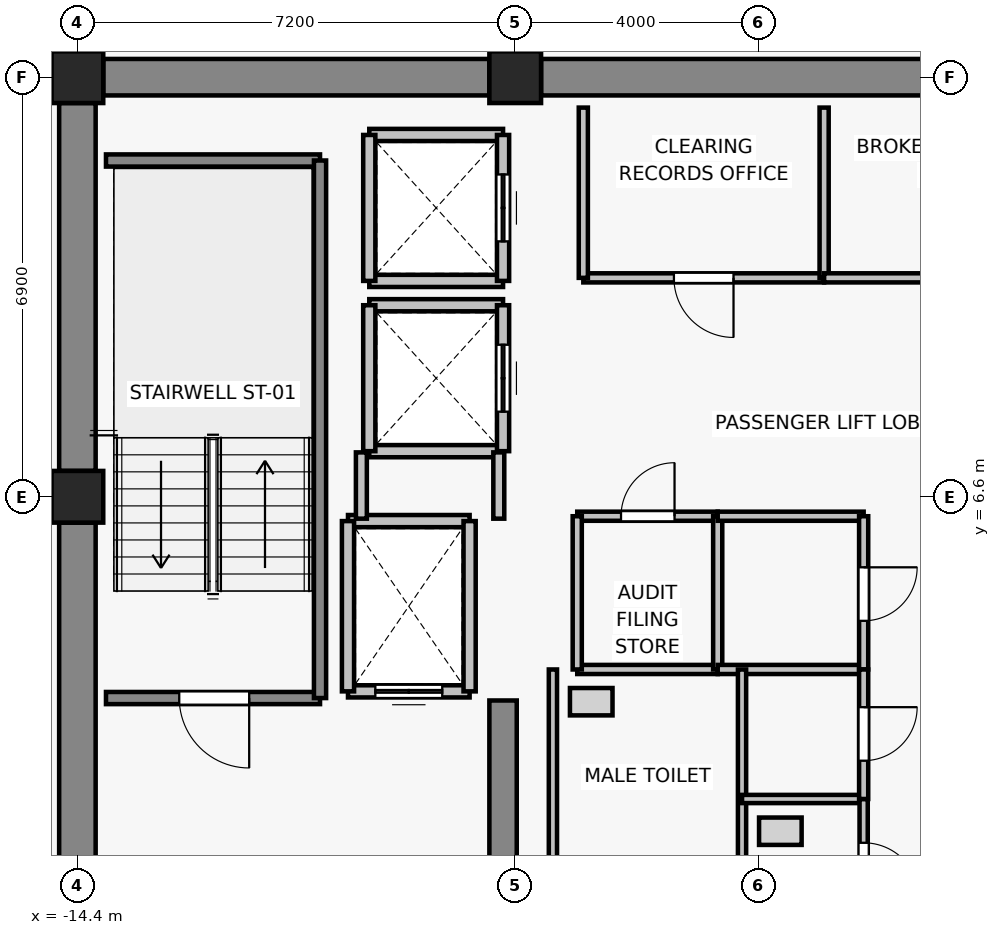
"""IFC4 building model, lengths in metres.
Left out: names, types, materials, properties, quantities, classifications, styles, units other than length and angle.
Written with IfcOpenShell. Run it as: python <this file> out.ifc"""

import sys

from ifc_helpers import new_model, si_unit, direction, frame, frame_2d, origin, origin_2d, place, context, subcontext, project, spatial, rectangle, extrude, source, transform, mapped, element, fill, save


model = new_model("IFC4")
c1 = context("Model", 3, precision=1e-05, world=origin(), true_north=direction((0.0, 1.0)))
c2 = subcontext(c1, "Body", "Model", "MODEL_VIEW")
j1 = project(units=[si_unit("LENGTHUNIT", "METRE"), si_unit("PLANEANGLEUNIT", "RADIAN")], contexts=[c1])
p1 = place(None, origin())
s1 = spatial("IfcSite", under=j1, at=p1, CompositionType="ELEMENT")
p2 = place(p1, origin())
s2 = spatial("IfcBuilding", under=s1, at=p2, CompositionType="ELEMENT")
p3 = place(p2, frame((0.0, 0.0, 248.5)))
s3 = spatial("IfcBuildingStorey", under=s2, at=p3, CompositionType="ELEMENT", Elevation=248.5)
for number, where, z_axis, x_axis in (
    (1, (-14.4, 6.6, 0.0), (0.0, 0.0, 1.0), (1.0, 0.0, 0.0)),
    (2, (-14.4, 13.5, 0.0), (0.0, 0.0, 1.0), (1.0, 0.0, 0.0)),
    (3, (-7.2, 13.5, 0.0), (0.0, 0.0, 1.0), (1.0, 0.0, 0.0)),
):
    element("IfcColumn", number, at=place(p3, frame(where, z_axis=z_axis, x_axis=x_axis)), inside=s3, PredefinedType="COLUMN", context=c2, shape_type="SweptSolid", body=[
        extrude(rectangle(XDim=0.85, YDim=0.85, at=origin_2d()), origin(), (0.0, 0.0, 1.0), 3.3),
    ])
p4 = place(p3, frame((-13.975, 13.5, 0.0), z_axis=(0.0, 0.0, 1.0), x_axis=(1.0, 0.0, 0.0)))
e4 = element("IfcWall", 4, at=p4, inside=s3, PredefinedType="SHEAR", context=c2, shape_type="SweptSolid", body=[
    extrude(rectangle(XDim=6.35, YDim=0.6, at=frame_2d((3.175, 0.0))), origin(), (0.0, 0.0, 1.0), 3.075),
])
p5 = place(p3, frame((-6.775, 13.5, 0.0), z_axis=(0.0, 0.0, 1.0), x_axis=(1.0, 0.0, 0.0)))
e5 = element("IfcWall", 5, at=p5, inside=s3, PredefinedType="SHEAR", context=c2, shape_type="SweptSolid", body=[
    extrude(rectangle(XDim=13.55, YDim=0.6, at=frame_2d((6.775, 0.0))), origin(), (0.0, 0.0, 1.0), 3.075),
])
p6 = place(p3, frame((-14.4, -0.775, 0.0), z_axis=(0.0, 0.0, 1.0), x_axis=(0.0, 1.0, 0.0)))
e6 = element("IfcWall", 6, at=p6, inside=s3, PredefinedType="SHEAR", context=c2, shape_type="SweptSolid", body=[
    extrude(rectangle(XDim=6.95, YDim=0.6, at=frame_2d((3.475, 0.0))), origin(), (0.0, 0.0, 1.0), 3.075),
])
p7 = place(p3, frame((-14.4, 7.025, 0.0), z_axis=(0.0, 0.0, 1.0), x_axis=(0.0, 1.0, 0.0)))
e7 = element("IfcWall", 7, at=p7, inside=s3, PredefinedType="SHEAR", context=c2, shape_type="SweptSolid", body=[
    extrude(rectangle(XDim=6.05, YDim=0.6, at=frame_2d((3.025, 0.0))), origin(), (0.0, 0.0, 1.0), 3.075),
])
p8 = place(p3, frame((-7.4, -0.9, 0.0), z_axis=(0.0, 0.0, 1.0), x_axis=(0.0, 1.0, 0.0)))
e8 = element("IfcWall", 8, at=p8, inside=s3, PredefinedType="SHEAR", context=c2, shape_type="SweptSolid", body=[
    extrude(rectangle(XDim=4.15, YDim=0.45, at=frame_2d((2.075, 0.0))), origin(), (0.0, 0.0, 1.0), 3.075),
])
p9 = place(p3, frame((-7.95, 3.4, 0.0), z_axis=(0.0, 0.0, 1.0), x_axis=(-1.0, 0.0, 0.0)))
e9 = element("IfcWall", 9, at=p9, inside=s3, PredefinedType="SOLIDWALL", context=c2, shape_type="SweptSolid", body=[
    extrude(rectangle(XDim=2.0, YDim=0.2, at=frame_2d((1.0, 0.0))), origin(), (0.0, 0.0, 1.0), 3.075),
])
p10 = place(p9, frame((0.45, 0.0, 0.0)))
e10 = element("IfcOpeningElement", 10, at=p10, cuts=e9, PredefinedType="OPENING", context=c2, shape_type="SweptSolid", body=[
    extrude(rectangle(XDim=1.1, YDim=2.2, at=frame_2d((0.55, 1.1))), frame((0.0, 0.11, 0.0), z_axis=(0.0, -1.0, 0.0), x_axis=(1.0, 0.0, 0.0)), (0.0, 0.0, 1.0), 0.22),
])
p11 = place(p3, frame((-9.95, 6.2, 0.0), z_axis=(0.0, 0.0, 1.0), x_axis=(1.0, 0.0, 0.0)))
e11 = element("IfcWall", 11, at=p11, inside=s3, PredefinedType="SOLIDWALL", context=c2, shape_type="SweptSolid", body=[
    extrude(rectangle(XDim=2.0, YDim=0.2, at=frame_2d((1.0, 0.0))), origin(), (0.0, 0.0, 1.0), 3.075),
])
for number, where, z_axis, x_axis in (
    (12, (-9.95, 3.4, 0.0), (0.0, 0.0, 1.0), (0.0, 1.0, 0.0)),
    (13, (-7.95, 6.2, 0.0), (0.0, 0.0, 1.0), (0.0, -1.0, 0.0)),
):
    element("IfcWall", number, at=place(p3, frame(where, z_axis=z_axis, x_axis=x_axis)), inside=s3, PredefinedType="SOLIDWALL", context=c2, shape_type="SweptSolid", body=[
        extrude(rectangle(XDim=2.8, YDim=0.2, at=frame_2d((1.4, 0.0))), origin(), (0.0, 0.0, 1.0), 3.075),
    ])
for number, where, z_axis, x_axis in (
    (14, (-7.4, 7.35, 0.0), (0.0, 0.0, 1.0), (-1.0, 0.0, 0.0)),
    (15, (-9.6, 9.75, 0.0), (0.0, 0.0, 1.0), (1.0, 0.0, 0.0)),
):
    element("IfcWall", number, at=place(p3, frame(where, z_axis=z_axis, x_axis=x_axis)), inside=s3, PredefinedType="SOLIDWALL", context=c2, shape_type="SweptSolid", body=[
        extrude(rectangle(XDim=2.2, YDim=0.2, at=frame_2d((1.1, 0.0))), origin(), (0.0, 0.0, 1.0), 2.615),
    ])
p12 = place(p3, frame((-9.6, 7.35, 0.0), z_axis=(0.0, 0.0, 1.0), x_axis=(0.0, 1.0, 0.0)))
e16 = element("IfcWall", 16, at=p12, inside=s3, PredefinedType="SOLIDWALL", context=c2, shape_type="SweptSolid", body=[
    extrude(rectangle(XDim=2.4, YDim=0.2, at=frame_2d((1.2, 0.0))), origin(), (0.0, 0.0, 1.0), 3.075),
])
p13 = place(p3, frame((-7.4, 9.75, 0.0), z_axis=(0.0, 0.0, 1.0), x_axis=(0.0, -1.0, 0.0)))
e17 = element("IfcWall", 17, at=p13, inside=s3, PredefinedType="SOLIDWALL", context=c2, shape_type="SweptSolid", body=[
    extrude(rectangle(XDim=2.4, YDim=0.2, at=frame_2d((1.2, 0.0))), origin(), (0.0, 0.0, 1.0), 2.615),
])
p14 = place(p13, frame((0.65, 0.0, 0.0)))
e18 = element("IfcOpeningElement", 18, at=p14, cuts=e17, PredefinedType="OPENING", context=c2, shape_type="SweptSolid", body=[
    extrude(rectangle(XDim=1.1, YDim=2.2, at=frame_2d((0.55, 1.1))), frame((0.0, 0.11, 0.0), z_axis=(0.0, -1.0, 0.0), x_axis=(1.0, 0.0, 0.0)), (0.0, 0.0, 1.0), 0.22),
])
for number, where, z_axis, x_axis in (
    (19, (-7.4, 10.15, 0.0), (0.0, 0.0, 1.0), (-1.0, 0.0, 0.0)),
    (20, (-9.6, 12.55, 0.0), (0.0, 0.0, 1.0), (1.0, 0.0, 0.0)),
):
    element("IfcWall", number, at=place(p3, frame(where, z_axis=z_axis, x_axis=x_axis)), inside=s3, PredefinedType="SOLIDWALL", context=c2, shape_type="SweptSolid", body=[
        extrude(rectangle(XDim=2.2, YDim=0.2, at=frame_2d((1.1, 0.0))), origin(), (0.0, 0.0, 1.0), 2.615),
    ])
p15 = place(p3, frame((-9.6, 10.15, 0.0), z_axis=(0.0, 0.0, 1.0), x_axis=(0.0, 1.0, 0.0)))
e21 = element("IfcWall", 21, at=p15, inside=s3, PredefinedType="SOLIDWALL", context=c2, shape_type="SweptSolid", body=[
    extrude(rectangle(XDim=2.4, YDim=0.2, at=frame_2d((1.2, 0.0))), origin(), (0.0, 0.0, 1.0), 3.075),
])
p16 = place(p3, frame((-7.4, 12.55, 0.0), z_axis=(0.0, 0.0, 1.0), x_axis=(0.0, -1.0, 0.0)))
e22 = element("IfcWall", 22, at=p16, inside=s3, PredefinedType="SOLIDWALL", context=c2, shape_type="SweptSolid", body=[
    extrude(rectangle(XDim=2.4, YDim=0.2, at=frame_2d((1.2, 0.0))), origin(), (0.0, 0.0, 1.0), 2.615),
])
p17 = place(p16, frame((0.65, 0.0, 0.0)))
e23 = element("IfcOpeningElement", 23, at=p17, cuts=e22, PredefinedType="OPENING", context=c2, shape_type="SweptSolid", body=[
    extrude(rectangle(XDim=1.1, YDim=2.2, at=frame_2d((0.55, 1.1))), frame((0.0, 0.11, 0.0), z_axis=(0.0, -1.0, 0.0), x_axis=(1.0, 0.0, 0.0)), (0.0, 0.0, 1.0), 0.22),
])
p18 = place(p3, frame((-10.41, 3.29, 0.0), z_axis=(0.0, 0.0, 1.0), x_axis=(-1.0, 0.0, 0.0)))
e24 = element("IfcWall", 24, at=p18, inside=s3, PredefinedType="SOLIDWALL", context=c2, shape_type="SweptSolid", body=[
    extrude(rectangle(XDim=3.52, YDim=0.2, at=frame_2d((1.76, 0.0))), origin(), (0.0, 0.0, 1.0), 3.075),
])
p19 = place(p18, frame((1.165, 0.0, 0.0)))
e25 = element("IfcOpeningElement", 25, at=p19, cuts=e24, PredefinedType="OPENING", context=c2, shape_type="SweptSolid", body=[
    extrude(rectangle(XDim=1.15, YDim=2.15, at=frame_2d((0.575, 1.075))), frame((0.0, 0.11, 0.0), z_axis=(0.0, -1.0, 0.0), x_axis=(1.0, 0.0, 0.0)), (0.0, 0.0, 1.0), 0.22),
])
p20 = place(p3, frame((-13.93, 12.13, 0.0), z_axis=(0.0, 0.0, 1.0), x_axis=(1.0, 0.0, 0.0)))
e26 = element("IfcWall", 26, at=p20, inside=s3, PredefinedType="SOLIDWALL", context=c2, shape_type="SweptSolid", body=[
    extrude(rectangle(XDim=3.52, YDim=0.2, at=frame_2d((1.76, 0.0))), origin(), (0.0, 0.0, 1.0), 3.075),
])
p21 = place(p3, frame((-10.41, 12.13, 0.0), z_axis=(0.0, 0.0, 1.0), x_axis=(0.0, -1.0, 0.0)))
e27 = element("IfcWall", 27, at=p21, inside=s3, PredefinedType="SOLIDWALL", context=c2, shape_type="SweptSolid", body=[
    extrude(rectangle(XDim=8.84, YDim=0.2, at=frame_2d((4.42, 0.0))), origin(), (0.0, 0.0, 1.0), 3.075),
])
p22 = place(p3, frame((-9.73, 6.24, 0.0), z_axis=(0.0, 0.0, 1.0), x_axis=(0.0, 1.0, 0.0)))
e28 = element("IfcWall", 28, at=p22, inside=s3, PredefinedType="PARTITIONING", context=c2, shape_type="SweptSolid", body=[
    extrude(rectangle(XDim=1.09, YDim=0.18, at=frame_2d((0.545, 0.0))), origin(), (0.0, 0.0, 1.0), 3.075),
])
p23 = place(p3, frame((-7.47, 7.33, 0.0), z_axis=(0.0, 0.0, 1.0), x_axis=(0.0, -1.0, 0.0)))
e29 = element("IfcWall", 29, at=p23, inside=s3, PredefinedType="PARTITIONING", context=c2, shape_type="SweptSolid", body=[
    extrude(rectangle(XDim=1.09, YDim=0.18, at=frame_2d((0.545, 0.0))), origin(), (0.0, 0.0, 1.0), 2.615),
])
p24 = place(p3, frame((-2.12, 10.2, 0.0), z_axis=(0.0, 0.0, 1.0), x_axis=(-1.0, 0.0, 0.0)))
e30 = element("IfcWall", 30, at=p24, inside=s3, PredefinedType="PARTITIONING", context=c2, shape_type="SweptSolid", body=[
    extrude(rectangle(XDim=3.96, YDim=0.15, at=frame_2d((1.98, 0.0))), origin(), (0.0, 0.0, 1.0), 3.075),
])
p25 = place(p24, frame((1.49, 0.0, 0.0)))
e31 = element("IfcOpeningElement", 31, at=p25, cuts=e30, PredefinedType="OPENING", context=c2, shape_type="SweptSolid", body=[
    extrude(rectangle(XDim=0.98, YDim=2.15, at=frame_2d((0.49, 1.075))), frame((0.0, 0.085, 0.0), z_axis=(0.0, -1.0, 0.0), x_axis=(1.0, 0.0, 0.0)), (0.0, 0.0, 1.0), 0.17),
])
for number, where, z_axis, x_axis in (
    (32, (-6.08, 10.2, 0.0), (0.0, 0.0, 1.0), (0.0, 1.0, 0.0)),
    (33, (-2.12, 13.0, 0.0), (0.0, 0.0, 1.0), (0.0, -1.0, 0.0)),
):
    element("IfcWall", number, at=place(p3, frame(where, z_axis=z_axis, x_axis=x_axis)), inside=s3, PredefinedType="PARTITIONING", context=c2, shape_type="SweptSolid", body=[
        extrude(rectangle(XDim=2.8, YDim=0.15, at=frame_2d((1.4, 0.0))), origin(), (0.0, 0.0, 1.0), 3.075),
    ])
p26 = place(p3, frame((2.04, 10.2, 0.0), z_axis=(0.0, 0.0, 1.0), x_axis=(-1.0, 0.0, 0.0)))
e34 = element("IfcWall", 34, at=p26, inside=s3, PredefinedType="PARTITIONING", context=c2, shape_type="SweptSolid", body=[
    extrude(rectangle(XDim=4.16, YDim=0.15, at=frame_2d((2.08, 0.0))), origin(), (0.0, 0.0, 1.0), 3.075),
])
p27 = place(p26, frame((1.55, 0.0, 0.0)))
e35 = element("IfcOpeningElement", 35, at=p27, cuts=e34, PredefinedType="OPENING", context=c2, shape_type="SweptSolid", body=[
    extrude(rectangle(XDim=0.98, YDim=2.15, at=frame_2d((0.49, 1.075))), frame((0.0, 0.085, 0.0), z_axis=(0.0, -1.0, 0.0), x_axis=(1.0, 0.0, 0.0)), (0.0, 0.0, 1.0), 0.17),
])
p28 = place(p3, frame((-3.87, 3.76, 0.0), z_axis=(0.0, 0.0, 1.0), x_axis=(-1.0, 0.0, 0.0)))
e36 = element("IfcWall", 36, at=p28, inside=s3, PredefinedType="PARTITIONING", context=c2, shape_type="SweptSolid", body=[
    extrude(rectangle(XDim=2.31, YDim=0.15, at=frame_2d((1.155, 0.0))), origin(), (0.0, 0.0, 1.0), 3.075),
])
p29 = place(p3, frame((-6.18, 6.28, 0.0), z_axis=(0.0, 0.0, 1.0), x_axis=(1.0, 0.0, 0.0)))
e37 = element("IfcWall", 37, at=p29, inside=s3, PredefinedType="PARTITIONING", context=c2, shape_type="SweptSolid", body=[
    extrude(rectangle(XDim=2.31, YDim=0.15, at=frame_2d((1.155, 0.0))), origin(), (0.0, 0.0, 1.0), 3.075),
])
p30 = place(p29, frame((0.72, 0.0, 0.0)))
e38 = element("IfcOpeningElement", 38, at=p30, cuts=e37, PredefinedType="OPENING", context=c2, shape_type="SweptSolid", body=[
    extrude(rectangle(XDim=0.88, YDim=2.1, at=frame_2d((0.44, 1.05))), frame((0.0, 0.085, 0.0), z_axis=(0.0, -1.0, 0.0), x_axis=(1.0, 0.0, 0.0)), (0.0, 0.0, 1.0), 0.17),
])
for number, where, z_axis, x_axis in (
    (39, (-6.18, 3.76, 0.0), (0.0, 0.0, 1.0), (0.0, 1.0, 0.0)),
    (40, (-3.87, 6.28, 0.0), (0.0, 0.0, 1.0), (0.0, -1.0, 0.0)),
):
    element("IfcWall", number, at=place(p3, frame(where, z_axis=z_axis, x_axis=x_axis)), inside=s3, PredefinedType="PARTITIONING", context=c2, shape_type="SweptSolid", body=[
        extrude(rectangle(XDim=2.52, YDim=0.15, at=frame_2d((1.26, 0.0))), origin(), (0.0, 0.0, 1.0), 3.075),
    ])
for number, where, z_axis, x_axis in (
    (41, (-1.47, 3.76, 0.0), (0.0, 0.0, 1.0), (-1.0, 0.0, 0.0)),
    (42, (-3.87, 6.28, 0.0), (0.0, 0.0, 1.0), (1.0, 0.0, 0.0)),
):
    element("IfcWall", number, at=place(p3, frame(where, z_axis=z_axis, x_axis=x_axis)), inside=s3, PredefinedType="PARTITIONING", context=c2, shape_type="SweptSolid", body=[
        extrude(rectangle(XDim=2.4, YDim=0.15, at=frame_2d((1.2, 0.0))), origin(), (0.0, 0.0, 1.0), 3.075),
    ])
p31 = place(p3, frame((-1.47, 6.28, 0.0), z_axis=(0.0, 0.0, 1.0), x_axis=(0.0, -1.0, 0.0)))
e43 = element("IfcWall", 43, at=p31, inside=s3, PredefinedType="PARTITIONING", context=c2, shape_type="SweptSolid", body=[
    extrude(rectangle(XDim=2.52, YDim=0.15, at=frame_2d((1.26, 0.0))), origin(), (0.0, 0.0, 1.0), 3.075),
])
p32 = place(p31, frame((0.84, 0.0, 0.0)))
e44 = element("IfcOpeningElement", 44, at=p32, cuts=e43, PredefinedType="OPENING", context=c2, shape_type="SweptSolid", body=[
    extrude(rectangle(XDim=0.88, YDim=2.1, at=frame_2d((0.44, 1.05))), frame((0.0, 0.085, 0.0), z_axis=(0.0, -1.0, 0.0), x_axis=(1.0, 0.0, 0.0)), (0.0, 0.0, 1.0), 0.17),
])
for number, where, z_axis, x_axis in (
    (45, (-6.58, -0.73, 0.0), (0.0, 0.0, 1.0), (0.0, 1.0, 0.0)),
    (46, (-3.47, 3.76, 0.0), (0.0, 0.0, 1.0), (0.0, -1.0, 0.0)),
):
    element("IfcWall", number, at=place(p3, frame(where, z_axis=z_axis, x_axis=x_axis)), inside=s3, PredefinedType="PARTITIONING", context=c2, shape_type="SweptSolid", body=[
        extrude(rectangle(XDim=4.49, YDim=0.135, at=frame_2d((2.245, 0.0))), origin(), (0.0, 0.0, 1.0), 3.075),
    ])
p33 = place(p3, frame((-3.47, 1.63, 0.0), z_axis=(0.0, 0.0, 1.0), x_axis=(1.0, 0.0, 0.0)))
e47 = element("IfcWall", 47, at=p33, inside=s3, PredefinedType="PARTITIONING", context=c2, shape_type="SweptSolid", body=[
    extrude(rectangle(XDim=2.0, YDim=0.135, at=frame_2d((1.0, 0.0))), origin(), (0.0, 0.0, 1.0), 3.075),
])
p34 = place(p3, frame((-1.47, 1.63, 0.0), z_axis=(0.0, 0.0, 1.0), x_axis=(0.0, -1.0, 0.0)))
e48 = element("IfcWall", 48, at=p34, inside=s3, PredefinedType="PARTITIONING", context=c2, shape_type="SweptSolid", body=[
    extrude(rectangle(XDim=2.36, YDim=0.135, at=frame_2d((1.18, 0.0))), origin(), (0.0, 0.0, 1.0), 3.075),
])
p35 = place(p34, frame((0.72, 0.0, 0.0)))
e49 = element("IfcOpeningElement", 49, at=p35, cuts=e48, PredefinedType="OPENING", context=c2, shape_type="SweptSolid", body=[
    extrude(rectangle(XDim=0.92, YDim=2.1, at=frame_2d((0.46, 1.05))), frame((0.0, 0.077, 0.0), z_axis=(0.0, -1.0, 0.0), x_axis=(1.0, 0.0, 0.0)), (0.0, 0.0, 1.0), 0.155),
])
p36 = place(p3, frame((-1.47, 3.76, 0.0), z_axis=(0.0, 0.0, 1.0), x_axis=(0.0, -1.0, 0.0)))
e50 = element("IfcWall", 50, at=p36, inside=s3, PredefinedType="PARTITIONING", context=c2, shape_type="SweptSolid", body=[
    extrude(rectangle(XDim=2.13, YDim=0.15, at=frame_2d((1.065, 0.0))), origin(), (0.0, 0.0, 1.0), 3.075),
])
p37 = place(p36, frame((0.62, 0.0, 0.0)))
e51 = element("IfcOpeningElement", 51, at=p37, cuts=e50, PredefinedType="OPENING", context=c2, shape_type="SweptSolid", body=[
    extrude(rectangle(XDim=0.88, YDim=2.1, at=frame_2d((0.44, 1.05))), frame((0.0, 0.085, 0.0), z_axis=(0.0, -1.0, 0.0), x_axis=(1.0, 0.0, 0.0)), (0.0, 0.0, 1.0), 0.17),
])
m1 = source(origin(), c2, "Body", "SweptSolid", [
    extrude(rectangle(XDim=1.1, YDim=2.2, at=frame_2d((0.55, 1.1))), frame((0.0, 0.025, 0.0), z_axis=(0.0, -1.0, 0.0), x_axis=(1.0, 0.0, 0.0)), (0.0, 0.0, 1.0), 0.05),
])
p38 = place(p10, origin())
e52 = element("IfcDoor", 52, at=p38, inside=s3, OperationType="DOUBLE_DOOR_SLIDING", PredefinedType="DOOR", context=c2, shape_type="MappedRepresentation", body=[
    mapped(m1, transform((0.0, 0.0, 0.0), x_axis=(1.0, 0.0, 0.0), y_axis=(0.0, 1.0, 0.0), z_axis=(0.0, 0.0, 1.0), scale=1.0)),
])
fill(e10, e52)
p39 = place(p14, origin())
e53 = element("IfcDoor", 53, at=p39, inside=s3, OperationType="DOUBLE_DOOR_SLIDING", PredefinedType="DOOR", context=c2, shape_type="MappedRepresentation", body=[
    mapped(m1, transform((0.0, 0.0, 0.0), x_axis=(1.0, 0.0, 0.0), y_axis=(0.0, 1.0, 0.0), z_axis=(0.0, 0.0, 1.0), scale=1.0)),
])
fill(e18, e53)
p40 = place(p17, origin())
e54 = element("IfcDoor", 54, at=p40, inside=s3, OperationType="DOUBLE_DOOR_SLIDING", PredefinedType="DOOR", context=c2, shape_type="MappedRepresentation", body=[
    mapped(m1, transform((0.0, 0.0, 0.0), x_axis=(1.0, 0.0, 0.0), y_axis=(0.0, 1.0, 0.0), z_axis=(0.0, 0.0, 1.0), scale=1.0)),
])
fill(e23, e54)
m2 = source(origin(), c2, "Body", "SweptSolid", [
    extrude(rectangle(XDim=1.15, YDim=2.15, at=frame_2d((0.575, 1.075))), frame((0.0, 0.025, 0.0), z_axis=(0.0, -1.0, 0.0), x_axis=(1.0, 0.0, 0.0)), (0.0, 0.0, 1.0), 0.05),
])
p41 = place(p19, origin())
e55 = element("IfcDoor", 55, at=p41, inside=s3, OperationType="SINGLE_SWING_LEFT", PredefinedType="DOOR", context=c2, shape_type="MappedRepresentation", body=[
    mapped(m2, transform((0.0, 0.0, 0.0), x_axis=(1.0, 0.0, 0.0), y_axis=(0.0, 1.0, 0.0), z_axis=(0.0, 0.0, 1.0), scale=1.0)),
])
fill(e25, e55)
m3 = source(origin(), c2, "Body", "SweptSolid", [
    extrude(rectangle(XDim=0.98, YDim=2.15, at=frame_2d((0.49, 1.075))), frame((0.0, 0.025, 0.0), z_axis=(0.0, -1.0, 0.0), x_axis=(1.0, 0.0, 0.0)), (0.0, 0.0, 1.0), 0.05),
])
p42 = place(p25, origin())
e56 = element("IfcDoor", 56, at=p42, inside=s3, OperationType="SINGLE_SWING_LEFT", PredefinedType="DOOR", context=c2, shape_type="MappedRepresentation", body=[
    mapped(m3, transform((0.0, 0.0, 0.0), x_axis=(1.0, 0.0, 0.0), y_axis=(0.0, 1.0, 0.0), z_axis=(0.0, 0.0, 1.0), scale=1.0)),
])
fill(e31, e56)
m4 = source(origin(), c2, "Body", "SweptSolid", [
    extrude(rectangle(XDim=0.88, YDim=2.1, at=frame_2d((0.44, 1.05))), frame((0.0, 0.025, 0.0), z_axis=(0.0, -1.0, 0.0), x_axis=(1.0, 0.0, 0.0)), (0.0, 0.0, 1.0), 0.05),
])
p43 = place(p30, origin())
e57 = element("IfcDoor", 57, at=p43, inside=s3, OperationType="SINGLE_SWING_RIGHT", PredefinedType="DOOR", context=c2, shape_type="MappedRepresentation", body=[
    mapped(m4, transform((0.0, 0.0, 0.0), x_axis=(1.0, 0.0, 0.0), y_axis=(0.0, 1.0, 0.0), z_axis=(0.0, 0.0, 1.0), scale=1.0)),
])
fill(e38, e57)
p44 = place(p32, origin())
e58 = element("IfcDoor", 58, at=p44, inside=s3, OperationType="SINGLE_SWING_LEFT", PredefinedType="DOOR", context=c2, shape_type="MappedRepresentation", body=[
    mapped(m4, transform((0.0, 0.0, 0.0), x_axis=(1.0, 0.0, 0.0), y_axis=(0.0, 1.0, 0.0), z_axis=(0.0, 0.0, 1.0), scale=1.0)),
])
fill(e44, e58)
m5 = source(origin(), c2, "Body", "SweptSolid", [
    extrude(rectangle(XDim=0.92, YDim=2.1, at=frame_2d((0.46, 1.05))), frame((0.0, 0.025, 0.0), z_axis=(0.0, -1.0, 0.0), x_axis=(1.0, 0.0, 0.0)), (0.0, 0.0, 1.0), 0.05),
])
p45 = place(p35, origin())
e59 = element("IfcDoor", 59, at=p45, inside=s3, OperationType="SINGLE_SWING_RIGHT", PredefinedType="DOOR", context=c2, shape_type="MappedRepresentation", body=[
    mapped(m5, transform((0.0, 0.0, 0.0), x_axis=(1.0, 0.0, 0.0), y_axis=(0.0, 1.0, 0.0), z_axis=(0.0, 0.0, 1.0), scale=1.0)),
])
fill(e49, e59)
p46 = place(p37, origin())
e60 = element("IfcDoor", 60, at=p46, inside=s3, OperationType="SINGLE_SWING_LEFT", PredefinedType="DOOR", context=c2, shape_type="MappedRepresentation", body=[
    mapped(m4, transform((0.0, 0.0, 0.0), x_axis=(1.0, 0.0, 0.0), y_axis=(0.0, 1.0, 0.0), z_axis=(0.0, 0.0, 1.0), scale=1.0)),
])
fill(e51, e60)
save(model, sys.argv[1])
